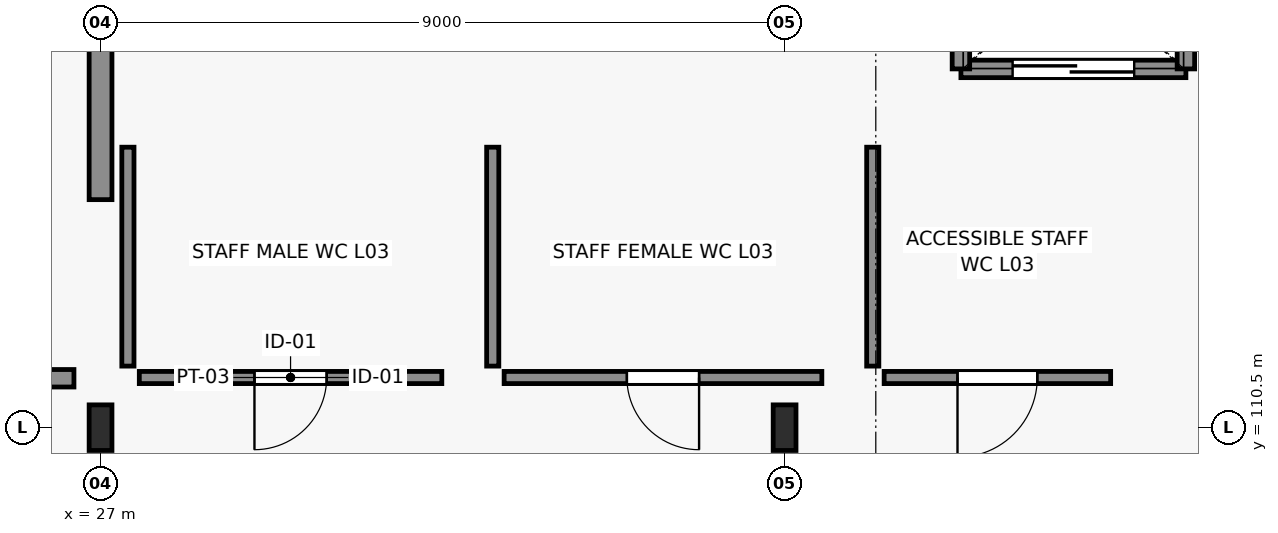
"""IFC4 building model, lengths in metres.
Left out: names, types, materials, properties, quantities, classifications, styles, units other than length and angle.
Written with IfcOpenShell. Run it as: python <this file> out.ifc"""

import sys

from ifc_helpers import new_model, si_unit, direction, frame, frame_2d, origin, origin_2d, place, context, subcontext, project, spatial, rectangle, i_section, extrude, element, fill, save


model = new_model("IFC4")
c1 = context("Model", 3, precision=1e-05, world=origin(), true_north=direction((0.0, 1.0)))
c2 = subcontext(c1, "Body", "Model", "MODEL_VIEW")
j1 = project(units=[si_unit("LENGTHUNIT", "METRE"), si_unit("PLANEANGLEUNIT", "RADIAN")], contexts=[c1])
p1 = place(None, origin())
s1 = spatial("IfcSite", under=j1, at=p1, CompositionType="ELEMENT")
p2 = place(p1, origin())
s2 = spatial("IfcBuilding", under=s1, at=p2, CompositionType="ELEMENT")
p3 = place(p2, frame((0.0, 0.0, 15.0)))
s3 = spatial("IfcBuildingStorey", under=s2, at=p3, CompositionType="ELEMENT", Elevation=15.0)
for number, where, z_axis, x_axis in (
    (1, (27.0, 110.5, 0.0), (0.0, 0.0, 1.0), (1.0, 0.0, 0.0)),
    (2, (36.0, 110.5, 0.0), (0.0, 0.0, 1.0), (1.0, 0.0, 0.0)),
):
    element("IfcColumn", number, at=place(p3, frame(where, z_axis=z_axis, x_axis=x_axis)), inside=s3, PredefinedType="COLUMN", context=c2, shape_type="SweptSolid", body=[
        extrude(i_section(OverallWidth=0.3, OverallDepth=0.6, WebThickness=0.015, FlangeThickness=0.03, FilletRadius=0.027, at=origin_2d()), origin(), (0.0, 0.0, 1.0), 4.285),
    ])
p4 = place(p3, frame((27.0, 113.5, 0.0), z_axis=(0.0, 0.0, 1.0), x_axis=(0.0, 1.0, 0.0)))
e3 = element("IfcWall", 3, at=p4, inside=s3, PredefinedType="SHEAR", context=c2, shape_type="SweptSolid", body=[
    extrude(rectangle(XDim=4.825, YDim=0.3, at=frame_2d((2.413, 0.0))), origin(), (0.0, 0.0, 1.0), 4.285),
])
p5 = place(p3, frame((31.49, 111.16, 0.0), z_axis=(0.0, 0.0, 1.0), x_axis=(-1.0, 0.0, 0.0)))
e4 = element("IfcWall", 4, at=p5, inside=s3, PredefinedType="PARTITIONING", context=c2, shape_type="SweptSolid", body=[
    extrude(rectangle(XDim=3.98, YDim=0.16, at=frame_2d((1.99, 0.0))), origin(), (0.0, 0.0, 1.0), 4.035),
])
p6 = place(p5, frame((1.515, 0.0, 0.0)))
e5 = element("IfcOpeningElement", 5, at=p6, cuts=e4, PredefinedType="OPENING", context=c2, shape_type="SweptSolid", body=[
    extrude(rectangle(XDim=0.95, YDim=2.15, at=frame_2d((0.475, 1.075))), frame((0.0, 0.09, 0.0), z_axis=(0.0, -1.0, 0.0), x_axis=(1.0, 0.0, 0.0)), (0.0, 0.0, 1.0), 0.18),
])
p7 = place(p3, frame((27.36, 111.31, 0.0), z_axis=(0.0, 0.0, 1.0), x_axis=(0.0, 1.0, 0.0)))
e6 = element("IfcWall", 6, at=p7, inside=s3, PredefinedType="PARTITIONING", context=c2, shape_type="SweptSolid", body=[
    extrude(rectangle(XDim=2.88, YDim=0.16, at=frame_2d((1.44, 0.0))), origin(), (0.0, 0.0, 1.0), 4.25),
])
p8 = place(p3, frame((36.49, 111.16, 0.0), z_axis=(0.0, 0.0, 1.0), x_axis=(-1.0, 0.0, 0.0)))
e7 = element("IfcWall", 7, at=p8, inside=s3, PredefinedType="PARTITIONING", context=c2, shape_type="SweptSolid", body=[
    extrude(rectangle(XDim=4.18, YDim=0.16, at=frame_2d((2.09, 0.0))), origin(), (0.0, 0.0, 1.0), 3.865),
])
p9 = place(p8, frame((1.615, 0.0, 0.0)))
e8 = element("IfcOpeningElement", 8, at=p9, cuts=e7, PredefinedType="OPENING", context=c2, shape_type="SweptSolid", body=[
    extrude(rectangle(XDim=0.95, YDim=2.15, at=frame_2d((0.475, 1.075))), frame((0.0, 0.09, 0.0), z_axis=(0.0, -1.0, 0.0), x_axis=(1.0, 0.0, 0.0)), (0.0, 0.0, 1.0), 0.18),
])
p10 = place(p3, frame((32.16, 111.31, 0.0), z_axis=(0.0, 0.0, 1.0), x_axis=(0.0, 1.0, 0.0)))
e9 = element("IfcWall", 9, at=p10, inside=s3, PredefinedType="PARTITIONING", context=c2, shape_type="SweptSolid", body=[
    extrude(rectangle(XDim=2.88, YDim=0.16, at=frame_2d((1.44, 0.0))), origin(), (0.0, 0.0, 1.0), 4.25),
])
p11 = place(p3, frame((40.29, 111.16, 0.0), z_axis=(0.0, 0.0, 1.0), x_axis=(-1.0, 0.0, 0.0)))
e10 = element("IfcWall", 10, at=p11, inside=s3, PredefinedType="PARTITIONING", context=c2, shape_type="SweptSolid", body=[
    extrude(rectangle(XDim=2.98, YDim=0.16, at=frame_2d((1.49, 0.0))), origin(), (0.0, 0.0, 1.0), 4.035),
])
p12 = place(p11, frame((0.965, 0.0, 0.0)))
e11 = element("IfcOpeningElement", 11, at=p12, cuts=e10, PredefinedType="OPENING", context=c2, shape_type="SweptSolid", body=[
    extrude(rectangle(XDim=1.05, YDim=2.2, at=frame_2d((0.525, 1.1))), frame((0.0, 0.09, 0.0), z_axis=(0.0, -1.0, 0.0), x_axis=(1.0, 0.0, 0.0)), (0.0, 0.0, 1.0), 0.18),
])
p13 = place(p3, frame((37.16, 111.31, 0.0), z_axis=(0.0, 0.0, 1.0), x_axis=(0.0, 1.0, 0.0)))
e12 = element("IfcWall", 12, at=p13, inside=s3, PredefinedType="PARTITIONING", context=c2, shape_type="SweptSolid", body=[
    extrude(rectangle(XDim=2.88, YDim=0.16, at=frame_2d((1.44, 0.0))), origin(), (0.0, 0.0, 1.0), 4.25),
])
p14 = place(p3, frame((41.28, 115.22, 0.0), z_axis=(0.0, 0.0, 1.0), x_axis=(-1.0, 0.0, 0.0)))
e13 = element("IfcWall", 13, at=p14, inside=s3, PredefinedType="SOLIDWALL", context=c2, shape_type="SweptSolid", body=[
    extrude(rectangle(XDim=2.96, YDim=0.23, at=frame_2d((1.48, 0.0))), origin(), (0.0, 0.0, 1.0), 4.035),
])
p15 = place(p14, frame((0.68, 0.0, 0.0)))
e14 = element("IfcOpeningElement", 14, at=p15, cuts=e13, PredefinedType="OPENING", context=c2, shape_type="SweptSolid", body=[
    extrude(rectangle(XDim=1.6, YDim=2.3, at=frame_2d((0.8, 1.15))), frame((0.0, 0.125, 0.0), z_axis=(0.0, -1.0, 0.0), x_axis=(1.0, 0.0, 0.0)), (0.0, 0.0, 1.0), 0.25),
])
for number, where, z_axis, x_axis in (
    (15, (38.32, 115.22, 0.0), (0.0, 0.0, 1.0), (0.0, 1.0, 0.0)),
    (16, (41.28, 117.78, 0.0), (0.0, 0.0, 1.0), (0.0, -1.0, 0.0)),
):
    element("IfcWall", number, at=place(p3, frame(where, z_axis=z_axis, x_axis=x_axis)), inside=s3, PredefinedType="SOLIDWALL", context=c2, shape_type="SweptSolid", body=[
        extrude(rectangle(XDim=2.56, YDim=0.23, at=frame_2d((1.28, 0.0))), origin(), (0.0, 0.0, 1.0), 4.26),
    ])
p16 = place(p3, frame((15.3, 111.15, 0.0), z_axis=(0.0, 0.0, 1.0), x_axis=(1.0, 0.0, 0.0)))
e17 = element("IfcWall", 17, at=p16, inside=s3, PredefinedType="SOLIDWALL", context=c2, shape_type="SweptSolid", body=[
    extrude(rectangle(XDim=11.35, YDim=0.23, at=frame_2d((5.675, 0.0))), origin(), (0.0, 0.0, 1.0), 3.865),
])
p17 = place(p16, frame((0.55, 0.0, 0.0)))
e18 = element("IfcOpeningElement", 18, at=p17, cuts=e17, PredefinedType="OPENING", context=c2, shape_type="SweptSolid", body=[
    extrude(rectangle(XDim=1.8, YDim=2.3, at=frame_2d((0.9, 1.15))), frame((0.0, 0.125, 0.0), z_axis=(0.0, -1.0, 0.0), x_axis=(1.0, 0.0, 0.0)), (0.0, 0.0, 1.0), 0.25),
])
p18 = place(p6, origin())
e19 = element("IfcDoor", 19, at=p18, inside=s3, OperationType="SINGLE_SWING_RIGHT", PredefinedType="DOOR", context=c2, shape_type="SweptSolid", body=[
    extrude(rectangle(XDim=0.95, YDim=2.15, at=frame_2d((0.475, 1.075))), frame((0.0, 0.025, 0.0), z_axis=(0.0, -1.0, 0.0), x_axis=(1.0, 0.0, 0.0)), (0.0, 0.0, 1.0), 0.05),
])
fill(e5, e19)
p19 = place(p9, origin())
e20 = element("IfcDoor", 20, at=p19, inside=s3, OperationType="SINGLE_SWING_LEFT", PredefinedType="DOOR", context=c2, shape_type="SweptSolid", body=[
    extrude(rectangle(XDim=0.95, YDim=2.15, at=frame_2d((0.475, 1.075))), frame((0.0, 0.025, 0.0), z_axis=(0.0, -1.0, 0.0), x_axis=(1.0, 0.0, 0.0)), (0.0, 0.0, 1.0), 0.05),
])
fill(e8, e20)
p20 = place(p12, origin())
e21 = element("IfcDoor", 21, at=p20, inside=s3, OperationType="SINGLE_SWING_RIGHT", PredefinedType="DOOR", context=c2, shape_type="SweptSolid", body=[
    extrude(rectangle(XDim=1.05, YDim=2.2, at=frame_2d((0.525, 1.1))), frame((0.0, 0.025, 0.0), z_axis=(0.0, -1.0, 0.0), x_axis=(1.0, 0.0, 0.0)), (0.0, 0.0, 1.0), 0.05),
])
fill(e11, e21)
p21 = place(p15, origin())
e22 = element("IfcDoor", 22, at=p21, inside=s3, OperationType="DOUBLE_DOOR_SLIDING", PredefinedType="DOOR", context=c2, shape_type="SweptSolid", body=[
    extrude(rectangle(XDim=1.6, YDim=2.3, at=frame_2d((0.8, 1.15))), frame((0.0, 0.025, 0.0), z_axis=(0.0, -1.0, 0.0), x_axis=(1.0, 0.0, 0.0)), (0.0, 0.0, 1.0), 0.05),
])
fill(e14, e22)
save(model, sys.argv[1])
